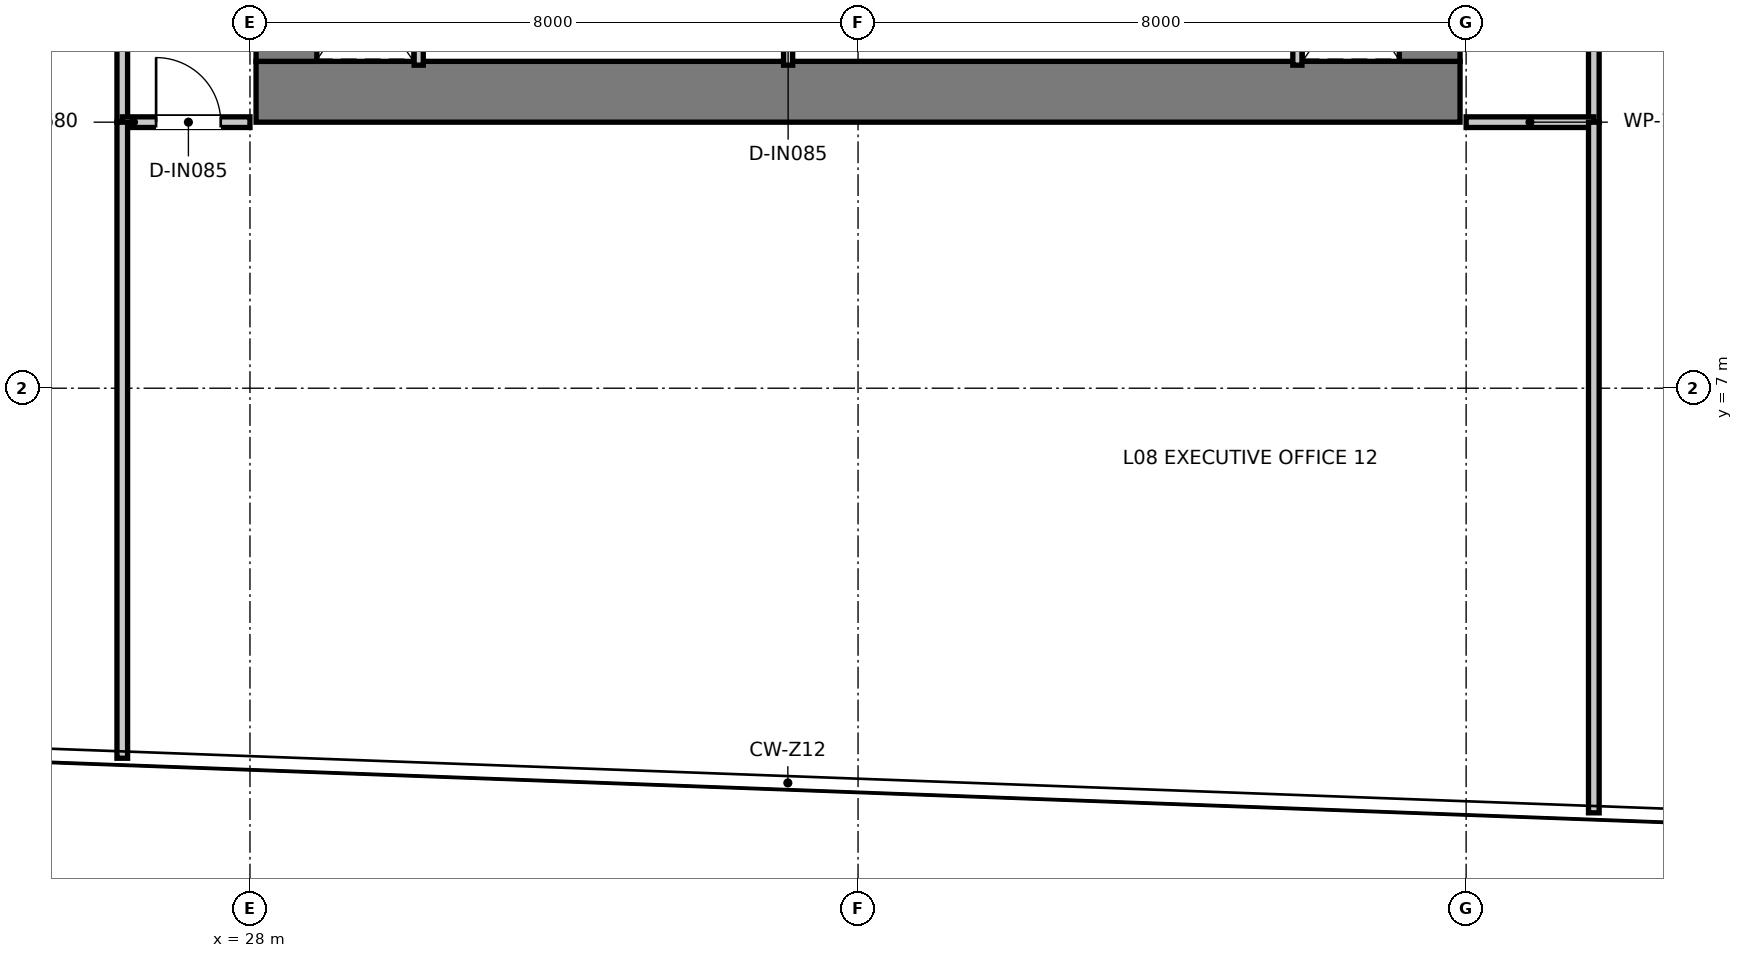
"""IFC4 building model, lengths in metres.
Left out: names, types, materials, properties, quantities, classifications, styles, units other than length and angle.
Written with IfcOpenShell. Run it as: python <this file> out.ifc"""

import sys

from ifc_helpers import new_model, si_unit, direction, frame, frame_2d, origin, place, context, subcontext, project, spatial, rectangle, extrude, element, fill, save


model = new_model("IFC4")
c1 = context("Model", 3, precision=1e-05, world=origin(), true_north=direction((0.0, 1.0)))
c2 = subcontext(c1, "Body", "Model", "MODEL_VIEW")
j1 = project(units=[si_unit("LENGTHUNIT", "METRE"), si_unit("PLANEANGLEUNIT", "RADIAN")], contexts=[c1])
p1 = place(None, origin())
s1 = spatial("IfcSite", under=j1, at=p1, CompositionType="ELEMENT")
p2 = place(p1, origin())
s2 = spatial("IfcBuilding", under=s1, at=p2, CompositionType="ELEMENT")
p3 = place(p2, frame((0.0, 0.0, 36.85)))
s3 = spatial("IfcBuildingStorey", under=s2, at=p3, CompositionType="ELEMENT", Elevation=36.85)
p4 = place(p3, frame((28.08, 10.9, 0.0), z_axis=(0.0, 0.0, 1.0), x_axis=(1.0, 0.0, 0.0)))
e1 = element("IfcWall", 1, at=p4, inside=s3, PredefinedType="SHEAR", context=c2, shape_type="SweptSolid", body=[
    extrude(rectangle(XDim=15.84, YDim=0.8, at=frame_2d((7.92, 0.0))), origin(), (0.0, 0.0, 1.0), 3.95),
])
for number, where, z_axis, x_axis in (
    (2, (28.48, 11.3, 0.0), (0.0, 0.0, 1.0), (0.0, 1.0, 0.0)),
    (3, (43.52, 11.3, 0.0), (0.0, 0.0, 1.0), (0.0, 1.0, 0.0)),
):
    element("IfcWall", number, at=place(p3, frame(where, z_axis=z_axis, x_axis=x_axis)), inside=s3, PredefinedType="SHEAR", context=c2, shape_type="SweptSolid", body=[
        extrude(rectangle(XDim=14.7, YDim=0.8, at=frame_2d((7.35, 0.0))), origin(), (0.0, 0.0, 1.0), 3.95),
    ])
for number, where, z_axis, x_axis in (
    (4, (30.22, 11.25, 0.0), (0.0, 0.0, 1.0), (0.0, 1.0, 0.0)),
    (5, (41.78, 11.25, 0.0), (0.0, 0.0, 1.0), (0.0, 1.0, 0.0)),
):
    element("IfcWall", number, at=place(p3, frame(where, z_axis=z_axis, x_axis=x_axis)), inside=s3, PredefinedType="PARTITIONING", context=c2, shape_type="SweptSolid", body=[
        extrude(rectangle(XDim=1.97, YDim=0.12, at=frame_2d((0.985, 0.0))), origin(), (0.0, 0.0, 1.0), 3.67),
    ])
p5 = place(p3, frame((35.08, 11.25, 0.0), z_axis=(0.0, 0.0, 1.0), x_axis=(0.0, 1.0, 0.0)))
e6 = element("IfcWall", 6, at=p5, inside=s3, PredefinedType="PARTITIONING", context=c2, shape_type="SweptSolid", body=[
    extrude(rectangle(XDim=1.97, YDim=0.12, at=frame_2d((0.985, 0.0))), origin(), (0.0, 0.0, 1.0), 3.67),
])
p6 = place(p5, frame((0.545, 0.0, 0.0)))
e7 = element("IfcOpeningElement", 7, at=p6, cuts=e6, PredefinedType="OPENING", context=c2, shape_type="SweptSolid", body=[
    extrude(rectangle(XDim=0.85, YDim=2.1, at=frame_2d((0.425, 1.05))), frame((0.0, 0.07, 0.0), z_axis=(0.0, -1.0, 0.0), x_axis=(1.0, 0.0, 0.0)), (0.0, 0.0, 1.0), 0.14),
])
p7 = place(p3, frame((26.32, 10.5, 0.0), z_axis=(0.0, 0.0, 1.0), x_axis=(0.0, 1.0, 0.0)))
e8 = element("IfcWall", 8, at=p7, inside=s3, PredefinedType="PARTITIONING", context=c2, shape_type="SweptSolid", body=[
    extrude(rectangle(XDim=25.62, YDim=0.14, at=frame_2d((12.81, 0.0))), origin(), (0.0, 0.0, 1.0), 2.97),
])
p8 = place(p7, frame((10.525, 0.0, 0.0)))
e9 = element("IfcOpeningElement", 9, at=p8, cuts=e8, PredefinedType="OPENING", context=c2, shape_type="SweptSolid", body=[
    extrude(rectangle(XDim=0.95, YDim=2.1, at=frame_2d((0.475, 1.05))), frame((0.0, 0.08, 0.0), z_axis=(0.0, -1.0, 0.0), x_axis=(1.0, 0.0, 0.0)), (0.0, 0.0, 1.0), 0.16),
])
p9 = place(p7, frame((19.125, 0.0, 0.0)))
e10 = element("IfcOpeningElement", 10, at=p9, cuts=e8, PredefinedType="OPENING", context=c2, shape_type="SweptSolid", body=[
    extrude(rectangle(XDim=0.95, YDim=2.1, at=frame_2d((0.475, 1.05))), frame((0.0, 0.08, 0.0), z_axis=(0.0, -1.0, 0.0), x_axis=(1.0, 0.0, 0.0)), (0.0, 0.0, 1.0), 0.16),
])
p10 = place(p3, frame((45.68, 10.5, 0.0), z_axis=(0.0, 0.0, 1.0), x_axis=(0.0, 1.0, 0.0)))
e11 = element("IfcWall", 11, at=p10, inside=s3, PredefinedType="PARTITIONING", context=c2, shape_type="SweptSolid", body=[
    extrude(rectangle(XDim=25.62, YDim=0.14, at=frame_2d((12.81, 0.0))), origin(), (0.0, 0.0, 1.0), 2.97),
])
p11 = place(p10, frame((7.675, 0.0, 0.0)))
e12 = element("IfcOpeningElement", 12, at=p11, cuts=e11, PredefinedType="OPENING", context=c2, shape_type="SweptSolid", body=[
    extrude(rectangle(XDim=0.95, YDim=2.1, at=frame_2d((0.475, 1.05))), frame((0.0, 0.08, 0.0), z_axis=(0.0, -1.0, 0.0), x_axis=(1.0, 0.0, 0.0)), (0.0, 0.0, 1.0), 0.16),
])
p12 = place(p10, frame((11.325, 0.0, 0.0)))
e13 = element("IfcOpeningElement", 13, at=p12, cuts=e11, PredefinedType="OPENING", context=c2, shape_type="SweptSolid", body=[
    extrude(rectangle(XDim=0.95, YDim=2.1, at=frame_2d((0.475, 1.05))), frame((0.0, 0.08, 0.0), z_axis=(0.0, -1.0, 0.0), x_axis=(1.0, 0.0, 0.0)), (0.0, 0.0, 1.0), 0.16),
])
p13 = place(p10, frame((16.325, 0.0, 0.0)))
e14 = element("IfcOpeningElement", 14, at=p13, cuts=e11, PredefinedType="OPENING", context=c2, shape_type="SweptSolid", body=[
    extrude(rectangle(XDim=0.95, YDim=2.1, at=frame_2d((0.475, 1.05))), frame((0.0, 0.08, 0.0), z_axis=(0.0, -1.0, 0.0), x_axis=(1.0, 0.0, 0.0)), (0.0, 0.0, 1.0), 0.16),
])
p14 = place(p10, frame((20.625, 0.0, 0.0)))
e15 = element("IfcOpeningElement", 15, at=p14, cuts=e11, PredefinedType="OPENING", context=c2, shape_type="SweptSolid", body=[
    extrude(rectangle(XDim=0.95, YDim=2.1, at=frame_2d((0.475, 1.05))), frame((0.0, 0.08, 0.0), z_axis=(0.0, -1.0, 0.0), x_axis=(1.0, 0.0, 0.0)), (0.0, 0.0, 1.0), 0.16),
])
p15 = place(p10, frame((23.075, 0.0, 0.0)))
e16 = element("IfcOpeningElement", 16, at=p15, cuts=e11, PredefinedType="OPENING", context=c2, shape_type="SweptSolid", body=[
    extrude(rectangle(XDim=0.95, YDim=2.1, at=frame_2d((0.475, 1.05))), frame((0.0, 0.08, 0.0), z_axis=(0.0, -1.0, 0.0), x_axis=(1.0, 0.0, 0.0)), (0.0, 0.0, 1.0), 0.16),
])
p16 = place(p3, frame((26.32, 10.5, 0.0), z_axis=(0.0, 0.0, 1.0), x_axis=(1.0, 0.0, 0.0)))
e17 = element("IfcWall", 17, at=p16, inside=s3, PredefinedType="PARTITIONING", context=c2, shape_type="SweptSolid", body=[
    extrude(rectangle(XDim=1.68, YDim=0.14, at=frame_2d((0.84, 0.0))), origin(), (0.0, 0.0, 1.0), 3.67),
])
p17 = place(p16, frame((0.445, 0.0, 0.0)))
e18 = element("IfcOpeningElement", 18, at=p17, cuts=e17, PredefinedType="OPENING", context=c2, shape_type="SweptSolid", body=[
    extrude(rectangle(XDim=0.85, YDim=2.1, at=frame_2d((0.425, 1.05))), frame((0.0, 0.08, 0.0), z_axis=(0.0, -1.0, 0.0), x_axis=(1.0, 0.0, 0.0)), (0.0, 0.0, 1.0), 0.16),
])
p18 = place(p3, frame((44.0, 10.5, 0.0), z_axis=(0.0, 0.0, 1.0), x_axis=(1.0, 0.0, 0.0)))
e19 = element("IfcWall", 19, at=p18, inside=s3, PredefinedType="PARTITIONING", context=c2, shape_type="SweptSolid", body=[
    extrude(rectangle(XDim=1.68, YDim=0.14, at=frame_2d((0.84, 0.0))), origin(), (0.0, 0.0, 1.0), 3.67),
])
p19 = place(p3, frame((26.32, 2.132, 0.0), z_axis=(0.0, 0.0, 1.0), x_axis=(0.0, 1.0, 0.0)))
e20 = element("IfcWall", 20, at=p19, inside=s3, PredefinedType="PARTITIONING", context=c2, shape_type="SweptSolid", body=[
    extrude(rectangle(XDim=8.368, YDim=0.14, at=frame_2d((4.184, 0.0))), origin(), (0.0, 0.0, 1.0), 3.67),
])
p20 = place(p3, frame((45.68, 1.414, 0.0), z_axis=(0.0, 0.0, 1.0), x_axis=(0.0, 1.0, 0.0)))
e21 = element("IfcWall", 21, at=p20, inside=s3, PredefinedType="PARTITIONING", context=c2, shape_type="SweptSolid", body=[
    extrude(rectangle(XDim=9.086, YDim=0.14, at=frame_2d((4.543, 0.0))), origin(), (0.0, 0.0, 1.0), 3.67),
])
p21 = place(p17, origin())
e22 = element("IfcDoor", 22, at=p21, inside=s3, OperationType="SINGLE_SWING_LEFT", PredefinedType="DOOR", context=c2, shape_type="SweptSolid", body=[
    extrude(rectangle(XDim=0.85, YDim=2.1, at=frame_2d((0.425, 1.05))), frame((0.0, 0.025, 0.0), z_axis=(0.0, -1.0, 0.0), x_axis=(1.0, 0.0, 0.0)), (0.0, 0.0, 1.0), 0.05),
])
fill(e18, e22)
save(model, sys.argv[1])
